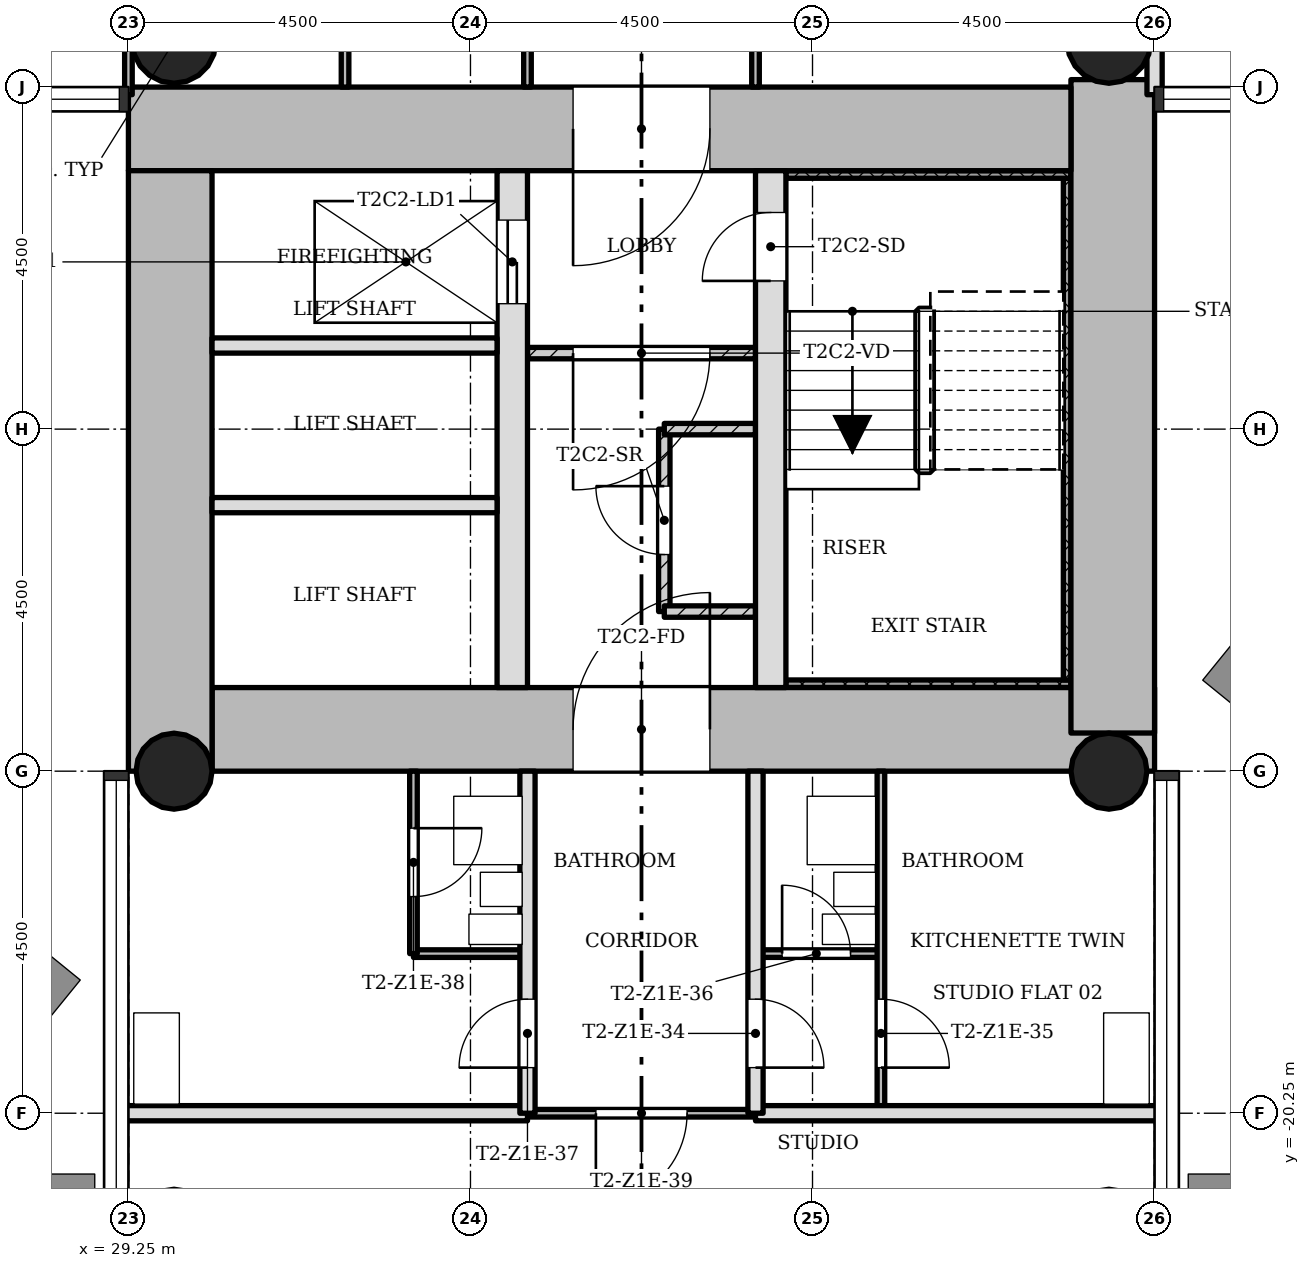
"""IFC4 building model, lengths in metres.
Left out: names, types, materials, properties, quantities, classifications, styles, units other than length and angle.
Written with IfcOpenShell. Run it as: python <this file> out.ifc"""

import sys

from ifc_helpers import new_model, si_unit, direction, frame, frame_2d, origin, origin_2d, place, context, subcontext, project, spatial, rectangle, hollow_circle, extrude, element, fill, save


model = new_model("IFC4")
c1 = context("Model", 3, precision=1e-05, world=origin(), true_north=direction((0.0, 1.0)))
c2 = subcontext(c1, "Body", "Model", "MODEL_VIEW")
j1 = project(units=[si_unit("LENGTHUNIT", "METRE"), si_unit("PLANEANGLEUNIT", "RADIAN")], contexts=[c1])
p1 = place(None, origin())
s1 = spatial("IfcSite", under=j1, at=p1, CompositionType="ELEMENT")
p2 = place(p1, origin())
s2 = spatial("IfcBuilding", under=s1, at=p2, CompositionType="ELEMENT")
p3 = place(p2, frame((0.0, 0.0, 65.3)))
s3 = spatial("IfcBuildingStorey", under=s2, at=p3, CompositionType="ELEMENT", Elevation=65.3)
p4 = place(p3, frame((30.35, -15.2, 0.0), z_axis=(0.0, 0.0, 1.0), x_axis=(1.0, 0.0, 0.0)))
e1 = element("IfcWall", 1, at=p4, inside=s3, PredefinedType="SHEAR", context=c2, shape_type="SweptSolid", body=[
    extrude(rectangle(XDim=12.4, YDim=1.1, at=frame_2d((6.2, 0.0))), origin(), (0.0, 0.0, 1.0), 3.4),
])
p5 = place(p4, frame((4.75, 0.0, 0.0)))
e2 = element("IfcOpeningElement", 2, at=p5, cuts=e1, PredefinedType="OPENING", context=c2, shape_type="SweptSolid", body=[
    extrude(rectangle(XDim=1.8, YDim=2.1, at=frame_2d((0.9, 1.05))), frame((0.0, 0.56, 0.0), z_axis=(0.0, -1.0, 0.0), x_axis=(1.0, 0.0, 0.0)), (0.0, 0.0, 1.0), 1.12),
])
p6 = place(p3, frame((42.2, -15.248, 0.0), z_axis=(0.0, 0.0, 1.0), x_axis=(0.0, 1.0, 0.0)))
e3 = element("IfcWall", 3, at=p6, inside=s3, PredefinedType="SHEAR", context=c2, shape_type="SweptSolid", body=[
    extrude(rectangle(XDim=8.596, YDim=1.1, at=frame_2d((4.298, 0.0))), origin(), (0.0, 0.0, 1.0), 3.4),
])
p7 = place(p3, frame((41.65, -7.3, 0.0), z_axis=(0.0, 0.0, 1.0), x_axis=(-1.0, 0.0, 0.0)))
e4 = element("IfcWall", 4, at=p7, inside=s3, PredefinedType="SHEAR", context=c2, shape_type="SweptSolid", body=[
    extrude(rectangle(XDim=12.4, YDim=1.1, at=frame_2d((6.2, 0.0))), origin(), (0.0, 0.0, 1.0), 3.4),
])
p8 = place(p7, frame((4.75, 0.0, 0.0)))
e5 = element("IfcOpeningElement", 5, at=p8, cuts=e4, PredefinedType="OPENING", context=c2, shape_type="SweptSolid", body=[
    extrude(rectangle(XDim=1.8, YDim=2.1, at=frame_2d((0.9, 1.05))), frame((0.0, 0.56, 0.0), z_axis=(0.0, -1.0, 0.0), x_axis=(1.0, 0.0, 0.0)), (0.0, 0.0, 1.0), 1.12),
])
p9 = place(p3, frame((29.8, -7.85, 0.0), z_axis=(0.0, 0.0, 1.0), x_axis=(0.0, -1.0, 0.0)))
e6 = element("IfcWall", 6, at=p9, inside=s3, PredefinedType="SHEAR", context=c2, shape_type="SweptSolid", body=[
    extrude(rectangle(XDim=7.9, YDim=1.1, at=frame_2d((3.95, 0.0))), origin(), (0.0, 0.0, 1.0), 3.4),
])
p10 = place(p3, frame((34.3, -14.65, 0.0), z_axis=(0.0, 0.0, 1.0), x_axis=(0.0, 1.0, 0.0)))
e7 = element("IfcWall", 7, at=p10, inside=s3, PredefinedType="SHEAR", context=c2, shape_type="SweptSolid", body=[
    extrude(rectangle(XDim=6.8, YDim=0.4, at=frame_2d((3.4, 0.0))), origin(), (0.0, 0.0, 1.0), 3.4),
])
p11 = place(p10, frame((5.05, 0.0, 0.0)))
e8 = element("IfcOpeningElement", 8, at=p11, cuts=e7, PredefinedType="OPENING", context=c2, shape_type="SweptSolid", body=[
    extrude(rectangle(XDim=1.1, YDim=2.1, at=frame_2d((0.55, 1.05))), frame((0.0, 0.21, 0.0), z_axis=(0.0, -1.0, 0.0), x_axis=(1.0, 0.0, 0.0)), (0.0, 0.0, 1.0), 0.42),
])
p12 = place(p3, frame((37.7, -14.65, 0.0), z_axis=(0.0, 0.0, 1.0), x_axis=(0.0, 1.0, 0.0)))
e9 = element("IfcWall", 9, at=p12, inside=s3, PredefinedType="SHEAR", context=c2, shape_type="SweptSolid", body=[
    extrude(rectangle(XDim=6.8, YDim=0.4, at=frame_2d((3.4, 0.0))), origin(), (0.0, 0.0, 1.0), 3.4),
])
p13 = place(p12, frame((5.35, 0.0, 0.0)))
e10 = element("IfcOpeningElement", 10, at=p13, cuts=e9, PredefinedType="OPENING", context=c2, shape_type="SweptSolid", body=[
    extrude(rectangle(XDim=0.9, YDim=2.1, at=frame_2d((0.45, 1.05))), frame((0.0, 0.21, 0.0), z_axis=(0.0, -1.0, 0.0), x_axis=(1.0, 0.0, 0.0)), (0.0, 0.0, 1.0), 0.42),
])
for number, where, z_axis, x_axis in (
    (11, (42.15, -15.75, 0.0), (0.0, 0.0, 1.0), (1.0, 0.0, 0.0)),
    (12, (29.85, -15.75, 0.0), (0.0, 0.0, 1.0), (1.0, 0.0, 0.0)),
):
    element("IfcColumn", number, at=place(p3, frame(where, z_axis=z_axis, x_axis=x_axis)), inside=s3, PredefinedType="COLUMN", context=c2, shape_type="SweptSolid", body=[
        extrude(hollow_circle(Radius=0.5, WallThickness=0.036, at=origin_2d()), origin(), (0.0, 0.0, 1.0), 3.4),
    ])
for number, where, z_axis, x_axis in (
    (13, (42.15, -6.15, 0.0), (0.0, 0.0, 1.0), (1.0, 0.0, 0.0)),
    (14, (29.85, -6.15, 0.0), (0.0, 0.0, 1.0), (1.0, 0.0, 0.0)),
):
    element("IfcColumn", number, at=place(p3, frame(where, z_axis=z_axis, x_axis=x_axis)), inside=s3, PredefinedType="COLUMN", context=c2, shape_type="SweptSolid", body=[
        extrude(hollow_circle(Radius=0.55, WallThickness=0.04, at=origin_2d()), origin(), (0.0, 0.0, 1.0), 3.4),
    ])
p14 = place(p3, frame((34.5, -10.25, 0.0), z_axis=(0.0, 0.0, 1.0), x_axis=(1.0, 0.0, 0.0)))
e15 = element("IfcWall", 15, at=p14, inside=s3, PredefinedType="PARTITIONING", context=c2, shape_type="SweptSolid", body=[
    extrude(rectangle(XDim=3.0, YDim=0.15, at=frame_2d((1.5, 0.0))), origin(), (0.0, 0.0, 1.0), 3.0),
])
p15 = place(p14, frame((0.6, 0.0, 0.0)))
e16 = element("IfcOpeningElement", 16, at=p15, cuts=e15, PredefinedType="OPENING", context=c2, shape_type="SweptSolid", body=[
    extrude(rectangle(XDim=1.8, YDim=2.1, at=frame_2d((0.9, 1.05))), frame((0.0, 0.085, 0.0), z_axis=(0.0, -1.0, 0.0), x_axis=(1.0, 0.0, 0.0)), (0.0, 0.0, 1.0), 0.17),
])
for number, where, z_axis, x_axis in (
    (17, (30.35, -10.15, 0.0), (0.0, 0.0, 1.0), (1.0, 0.0, 0.0)),
    (18, (30.35, -12.25, 0.0), (0.0, 0.0, 1.0), (1.0, 0.0, 0.0)),
):
    element("IfcWall", number, at=place(p3, frame(where, z_axis=z_axis, x_axis=x_axis)), inside=s3, PredefinedType="SOLIDWALL", context=c2, shape_type="SweptSolid", body=[
        extrude(rectangle(XDim=3.75, YDim=0.2, at=frame_2d((1.875, 0.0))), origin(), (0.0, 0.0, 1.0), 3.0),
    ])
p16 = place(p3, frame((36.3, -11.25, 0.0), z_axis=(0.0, 0.0, 1.0), x_axis=(0.0, -1.0, 0.0)))
e19 = element("IfcWall", 19, at=p16, inside=s3, PredefinedType="PARTITIONING", context=c2, shape_type="SweptSolid", body=[
    extrude(rectangle(XDim=2.4, YDim=0.15, at=frame_2d((1.2, 0.0))), origin(), (0.0, 0.0, 1.0), 3.0),
])
p17 = place(p16, frame((0.75, 0.0, 0.0)))
e20 = element("IfcOpeningElement", 20, at=p17, cuts=e19, PredefinedType="OPENING", context=c2, shape_type="SweptSolid", body=[
    extrude(rectangle(XDim=0.9, YDim=2.1, at=frame_2d((0.45, 1.05))), frame((0.0, 0.085, 0.0), z_axis=(0.0, -1.0, 0.0), x_axis=(1.0, 0.0, 0.0)), (0.0, 0.0, 1.0), 0.17),
])
for number, where, z_axis, x_axis in (
    (21, (36.3, -11.25, 0.0), (0.0, 0.0, 1.0), (1.0, 0.0, 0.0)),
    (22, (36.3, -13.65, 0.0), (0.0, 0.0, 1.0), (1.0, 0.0, 0.0)),
):
    element("IfcWall", number, at=place(p3, frame(where, z_axis=z_axis, x_axis=x_axis)), inside=s3, PredefinedType="PARTITIONING", context=c2, shape_type="SweptSolid", body=[
        extrude(rectangle(XDim=1.2, YDim=0.15, at=frame_2d((0.6, 0.0))), origin(), (0.0, 0.0, 1.0), 3.0),
    ])
p18 = place(p3, frame((37.5, -20.25, 0.0), z_axis=(0.0, 0.0, 1.0), x_axis=(-1.0, 0.0, 0.0)))
e23 = element("IfcWall", 23, at=p18, inside=s3, PredefinedType="PARTITIONING", context=c2, shape_type="SweptSolid", body=[
    extrude(rectangle(XDim=3.0, YDim=0.1, at=frame_2d((1.5, 0.0))), origin(), (0.0, 0.0, 1.0), 3.0),
])
p19 = place(p18, frame((0.9, 0.0, 0.0)))
e24 = element("IfcOpeningElement", 24, at=p19, cuts=e23, PredefinedType="OPENING", context=c2, shape_type="SweptSolid", body=[
    extrude(rectangle(XDim=1.2, YDim=2.1, at=frame_2d((0.6, 1.05))), frame((0.0, 0.06, 0.0), z_axis=(0.0, -1.0, 0.0), x_axis=(1.0, 0.0, 0.0)), (0.0, 0.0, 1.0), 0.12),
])
for number, where, z_axis, x_axis in (
    (25, (42.85, -20.25, 0.0), (0.0, 0.0, 1.0), (-1.0, 0.0, 0.0)),
    (26, (34.5, -20.25, 0.0), (0.0, 0.0, 1.0), (-1.0, 0.0, 0.0)),
):
    element("IfcWall", number, at=place(p3, frame(where, z_axis=z_axis, x_axis=x_axis)), inside=s3, PredefinedType="SOLIDWALL", context=c2, shape_type="SweptSolid", body=[
        extrude(rectangle(XDim=5.35, YDim=0.2, at=frame_2d((2.675, 0.0))), origin(), (0.0, 0.0, 1.0), 3.0),
    ])
p20 = place(p3, frame((39.15, -18.15, 0.0), z_axis=(0.0, 0.0, 1.0), x_axis=(-1.0, 0.0, 0.0)))
e27 = element("IfcWall", 27, at=p20, inside=s3, PredefinedType="PARTITIONING", context=c2, shape_type="SweptSolid", body=[
    extrude(rectangle(XDim=1.65, YDim=0.1, at=frame_2d((0.825, 0.0))), origin(), (0.0, 0.0, 1.0), 3.0),
])
p21 = place(p20, frame((0.4, 0.0, 0.0)))
e28 = element("IfcOpeningElement", 28, at=p21, cuts=e27, PredefinedType="OPENING", context=c2, shape_type="SweptSolid", body=[
    extrude(rectangle(XDim=0.9, YDim=2.1, at=frame_2d((0.45, 1.05))), frame((0.0, 0.06, 0.0), z_axis=(0.0, -1.0, 0.0), x_axis=(1.0, 0.0, 0.0)), (0.0, 0.0, 1.0), 0.12),
])
p22 = place(p3, frame((34.5, -18.15, 0.0), z_axis=(0.0, 0.0, 1.0), x_axis=(-1.0, 0.0, 0.0)))
e29 = element("IfcWall", 29, at=p22, inside=s3, PredefinedType="PARTITIONING", context=c2, shape_type="SweptSolid", body=[
    extrude(rectangle(XDim=1.5, YDim=0.1, at=frame_2d((0.75, 0.0))), origin(), (0.0, 0.0, 1.0), 3.0),
])
p23 = place(p3, frame((42.75, -6.85, 0.0), z_axis=(0.0, 0.0, 1.0), x_axis=(0.0, 1.0, 0.0)))
e30 = element("IfcWall", 30, at=p23, inside=s3, PredefinedType="SOLIDWALL", context=c2, shape_type="SweptSolid", body=[
    extrude(rectangle(XDim=13.7, YDim=0.2, at=frame_2d((6.85, 0.0))), origin(), (0.0, 0.0, 1.0), 3.0),
])
p24 = place(p23, frame((6.4, 0.0, 0.0)))
e31 = element("IfcOpeningElement", 31, at=p24, cuts=e30, PredefinedType="OPENING", context=c2, shape_type="SweptSolid", body=[
    extrude(rectangle(XDim=0.9, YDim=2.1, at=frame_2d((0.45, 1.05))), frame((0.0, 0.11, 0.0), z_axis=(0.0, -1.0, 0.0), x_axis=(1.0, 0.0, 0.0)), (0.0, 0.0, 1.0), 0.22),
])
p25 = place(p3, frame((39.15, -20.25, 0.0), z_axis=(0.0, 0.0, 1.0), x_axis=(0.0, 1.0, 0.0)))
e32 = element("IfcWall", 32, at=p25, inside=s3, PredefinedType="PARTITIONING", context=c2, shape_type="SweptSolid", body=[
    extrude(rectangle(XDim=4.5, YDim=0.1, at=frame_2d((2.25, 0.0))), origin(), (0.0, 0.0, 1.0), 3.0),
])
p26 = place(p25, frame((0.6, 0.0, 0.0)))
e33 = element("IfcOpeningElement", 33, at=p26, cuts=e32, PredefinedType="OPENING", context=c2, shape_type="SweptSolid", body=[
    extrude(rectangle(XDim=0.9, YDim=2.1, at=frame_2d((0.45, 1.05))), frame((0.0, 0.06, 0.0), z_axis=(0.0, -1.0, 0.0), x_axis=(1.0, 0.0, 0.0)), (0.0, 0.0, 1.0), 0.12),
])
p27 = place(p3, frame((37.5, -6.75, 0.0), z_axis=(0.0, 0.0, 1.0), x_axis=(0.0, 1.0, 0.0)))
e34 = element("IfcWall", 34, at=p27, inside=s3, PredefinedType="PARTITIONING", context=c2, shape_type="SweptSolid", body=[
    extrude(rectangle(XDim=5.85, YDim=0.1, at=frame_2d((2.925, 0.0))), origin(), (0.0, 0.0, 1.0), 3.0),
])
p28 = place(p27, frame((0.975, 0.0, 0.0)))
e35 = element("IfcOpeningElement", 35, at=p28, cuts=e34, PredefinedType="OPENING", context=c2, shape_type="SweptSolid", body=[
    extrude(rectangle(XDim=0.9, YDim=2.1, at=frame_2d((0.45, 1.05))), frame((0.0, 0.06, 0.0), z_axis=(0.0, -1.0, 0.0), x_axis=(1.0, 0.0, 0.0)), (0.0, 0.0, 1.0), 0.12),
])
p29 = place(p3, frame((37.5, -20.25, 0.0), z_axis=(0.0, 0.0, 1.0), x_axis=(0.0, 1.0, 0.0)))
e36 = element("IfcWall", 36, at=p29, inside=s3, PredefinedType="SOLIDWALL", context=c2, shape_type="SweptSolid", body=[
    extrude(rectangle(XDim=4.5, YDim=0.2, at=frame_2d((2.25, 0.0))), origin(), (0.0, 0.0, 1.0), 3.0),
])
p30 = place(p29, frame((0.6, 0.0, 0.0)))
e37 = element("IfcOpeningElement", 37, at=p30, cuts=e36, PredefinedType="OPENING", context=c2, shape_type="SweptSolid", body=[
    extrude(rectangle(XDim=0.9, YDim=2.1, at=frame_2d((0.45, 1.05))), frame((0.0, 0.11, 0.0), z_axis=(0.0, -1.0, 0.0), x_axis=(1.0, 0.0, 0.0)), (0.0, 0.0, 1.0), 0.22),
])
p31 = place(p3, frame((34.5, -6.75, 0.0), z_axis=(0.0, 0.0, 1.0), x_axis=(0.0, 1.0, 0.0)))
e38 = element("IfcWall", 38, at=p31, inside=s3, PredefinedType="PARTITIONING", context=c2, shape_type="SweptSolid", body=[
    extrude(rectangle(XDim=5.85, YDim=0.1, at=frame_2d((2.925, 0.0))), origin(), (0.0, 0.0, 1.0), 3.0),
])
p32 = place(p31, frame((1.575, 0.0, 0.0)))
e39 = element("IfcOpeningElement", 39, at=p32, cuts=e38, PredefinedType="OPENING", context=c2, shape_type="SweptSolid", body=[
    extrude(rectangle(XDim=0.9, YDim=2.1, at=frame_2d((0.45, 1.05))), frame((0.0, 0.06, 0.0), z_axis=(0.0, -1.0, 0.0), x_axis=(1.0, 0.0, 0.0)), (0.0, 0.0, 1.0), 0.12),
])
p33 = place(p3, frame((34.5, -20.25, 0.0), z_axis=(0.0, 0.0, 1.0), x_axis=(0.0, 1.0, 0.0)))
e40 = element("IfcWall", 40, at=p33, inside=s3, PredefinedType="SOLIDWALL", context=c2, shape_type="SweptSolid", body=[
    extrude(rectangle(XDim=4.5, YDim=0.2, at=frame_2d((2.25, 0.0))), origin(), (0.0, 0.0, 1.0), 3.0),
])
p34 = place(p33, frame((0.6, 0.0, 0.0)))
e41 = element("IfcOpeningElement", 41, at=p34, cuts=e40, PredefinedType="OPENING", context=c2, shape_type="SweptSolid", body=[
    extrude(rectangle(XDim=0.9, YDim=2.1, at=frame_2d((0.45, 1.05))), frame((0.0, 0.11, 0.0), z_axis=(0.0, -1.0, 0.0), x_axis=(1.0, 0.0, 0.0)), (0.0, 0.0, 1.0), 0.22),
])
p35 = place(p3, frame((33.0, -18.15, 0.0), z_axis=(0.0, 0.0, 1.0), x_axis=(0.0, 1.0, 0.0)))
e42 = element("IfcWall", 42, at=p35, inside=s3, PredefinedType="PARTITIONING", context=c2, shape_type="SweptSolid", body=[
    extrude(rectangle(XDim=2.4, YDim=0.1, at=frame_2d((1.2, 0.0))), origin(), (0.0, 0.0, 1.0), 3.0),
])
p36 = place(p35, frame((0.75, 0.0, 0.0)))
e43 = element("IfcOpeningElement", 43, at=p36, cuts=e42, PredefinedType="OPENING", context=c2, shape_type="SweptSolid", body=[
    extrude(rectangle(XDim=0.9, YDim=2.1, at=frame_2d((0.45, 1.05))), frame((0.0, 0.06, 0.0), z_axis=(0.0, -1.0, 0.0), x_axis=(1.0, 0.0, 0.0)), (0.0, 0.0, 1.0), 0.12),
])
p37 = place(p3, frame((32.1, -6.75, 0.0), z_axis=(0.0, 0.0, 1.0), x_axis=(0.0, 1.0, 0.0)))
e44 = element("IfcWall", 44, at=p37, inside=s3, PredefinedType="PARTITIONING", context=c2, shape_type="SweptSolid", body=[
    extrude(rectangle(XDim=5.85, YDim=0.1, at=frame_2d((2.925, 0.0))), origin(), (0.0, 0.0, 1.0), 3.0),
])
p38 = place(p3, frame((29.25, -6.85, 0.0), z_axis=(0.0, 0.0, 1.0), x_axis=(0.0, 1.0, 0.0)))
e45 = element("IfcWall", 45, at=p38, inside=s3, PredefinedType="PARTITIONING", context=c2, shape_type="SweptSolid", body=[
    extrude(rectangle(XDim=5.95, YDim=0.1, at=frame_2d((2.975, 0.0))), origin(), (0.0, 0.0, 1.0), 3.0),
])
p39 = place(p3, frame((37.9, -14.6, 0.0), z_axis=(0.0, 0.0, 1.0), x_axis=(1.0, 0.0, 0.0)))
e46 = element("IfcWall", 46, at=p39, inside=s3, PredefinedType="SHEAR", context=c2, shape_type="SweptSolid", body=[
    extrude(rectangle(XDim=3.75, YDim=0.1, at=frame_2d((1.875, 0.0))), origin(), (0.0, 0.0, 1.0), 3.4),
])
p40 = place(p3, frame((41.6, -7.95, 0.0), z_axis=(0.0, 0.0, 1.0), x_axis=(0.0, -1.0, 0.0)))
e47 = element("IfcWall", 47, at=p40, inside=s3, PredefinedType="SHEAR", context=c2, shape_type="SweptSolid", body=[
    extrude(rectangle(XDim=6.6, YDim=0.1, at=frame_2d((3.3, 0.0))), origin(), (0.0, 0.0, 1.0), 3.4),
])
p41 = place(p3, frame((37.9, -7.9, 0.0), z_axis=(0.0, 0.0, 1.0), x_axis=(1.0, 0.0, 0.0)))
e48 = element("IfcWall", 48, at=p41, inside=s3, PredefinedType="SHEAR", context=c2, shape_type="SweptSolid", body=[
    extrude(rectangle(XDim=3.75, YDim=0.1, at=frame_2d((1.875, 0.0))), origin(), (0.0, 0.0, 1.0), 3.4),
])
p42 = place(p15, origin())
e49 = element("IfcDoor", 49, at=p42, inside=s3, OperationType="SINGLE_SWING_LEFT", PredefinedType="DOOR", context=c2, shape_type="SweptSolid", body=[
    extrude(rectangle(XDim=1.8, YDim=2.1, at=frame_2d((0.9, 1.05))), frame((0.0, 0.025, 0.0), z_axis=(0.0, -1.0, 0.0), x_axis=(1.0, 0.0, 0.0)), (0.0, 0.0, 1.0), 0.05),
])
fill(e16, e49)
p43 = place(p17, origin())
e50 = element("IfcDoor", 50, at=p43, inside=s3, OperationType="SINGLE_SWING_LEFT", PredefinedType="DOOR", context=c2, shape_type="SweptSolid", body=[
    extrude(rectangle(XDim=0.9, YDim=2.1, at=frame_2d((0.45, 1.05))), frame((0.0, 0.025, 0.0), z_axis=(0.0, -1.0, 0.0), x_axis=(1.0, 0.0, 0.0)), (0.0, 0.0, 1.0), 0.05),
])
fill(e20, e50)
p44 = place(p30, origin())
e51 = element("IfcDoor", 51, at=p44, inside=s3, OperationType="SINGLE_SWING_LEFT", PredefinedType="DOOR", context=c2, shape_type="SweptSolid", body=[
    extrude(rectangle(XDim=0.9, YDim=2.1, at=frame_2d((0.45, 1.05))), frame((0.0, 0.025, 0.0), z_axis=(0.0, -1.0, 0.0), x_axis=(1.0, 0.0, 0.0)), (0.0, 0.0, 1.0), 0.05),
])
fill(e37, e51)
p45 = place(p26, origin())
e52 = element("IfcDoor", 52, at=p45, inside=s3, OperationType="SINGLE_SWING_LEFT", PredefinedType="DOOR", context=c2, shape_type="SweptSolid", body=[
    extrude(rectangle(XDim=0.9, YDim=2.1, at=frame_2d((0.45, 1.05))), frame((0.0, 0.025, 0.0), z_axis=(0.0, -1.0, 0.0), x_axis=(1.0, 0.0, 0.0)), (0.0, 0.0, 1.0), 0.05),
])
fill(e33, e52)
p46 = place(p21, origin())
e53 = element("IfcDoor", 53, at=p46, inside=s3, OperationType="SINGLE_SWING_RIGHT", PredefinedType="DOOR", context=c2, shape_type="SweptSolid", body=[
    extrude(rectangle(XDim=0.9, YDim=2.1, at=frame_2d((0.45, 1.05))), frame((0.0, 0.025, 0.0), z_axis=(0.0, -1.0, 0.0), x_axis=(1.0, 0.0, 0.0)), (0.0, 0.0, 1.0), 0.05),
])
fill(e28, e53)
p47 = place(p34, origin())
e54 = element("IfcDoor", 54, at=p47, inside=s3, OperationType="SINGLE_SWING_RIGHT", PredefinedType="DOOR", context=c2, shape_type="SweptSolid", body=[
    extrude(rectangle(XDim=0.9, YDim=2.1, at=frame_2d((0.45, 1.05))), frame((0.0, 0.025, 0.0), z_axis=(0.0, -1.0, 0.0), x_axis=(1.0, 0.0, 0.0)), (0.0, 0.0, 1.0), 0.05),
])
fill(e41, e54)
p48 = place(p36, origin())
e55 = element("IfcDoor", 55, at=p48, inside=s3, OperationType="SINGLE_SWING_RIGHT", PredefinedType="DOOR", context=c2, shape_type="SweptSolid", body=[
    extrude(rectangle(XDim=0.9, YDim=2.1, at=frame_2d((0.45, 1.05))), frame((0.0, 0.025, 0.0), z_axis=(0.0, -1.0, 0.0), x_axis=(1.0, 0.0, 0.0)), (0.0, 0.0, 1.0), 0.05),
])
fill(e43, e55)
p49 = place(p19, origin())
e56 = element("IfcDoor", 56, at=p49, inside=s3, OperationType="SINGLE_SWING_LEFT", PredefinedType="DOOR", context=c2, shape_type="SweptSolid", body=[
    extrude(rectangle(XDim=1.2, YDim=2.1, at=frame_2d((0.6, 1.05))), frame((0.0, 0.025, 0.0), z_axis=(0.0, -1.0, 0.0), x_axis=(1.0, 0.0, 0.0)), (0.0, 0.0, 1.0), 0.05),
])
fill(e24, e56)
p50 = place(p13, origin())
e57 = element("IfcDoor", 57, at=p50, inside=s3, OperationType="SINGLE_SWING_RIGHT", PredefinedType="DOOR", context=c2, shape_type="SweptSolid", body=[
    extrude(rectangle(XDim=0.9, YDim=2.1, at=frame_2d((0.45, 1.05))), frame((0.0, 0.025, 0.0), z_axis=(0.0, -1.0, 0.0), x_axis=(1.0, 0.0, 0.0)), (0.0, 0.0, 1.0), 0.05),
])
fill(e10, e57)
p51 = place(p11, origin())
e58 = element("IfcDoor", 58, at=p51, inside=s3, OperationType="SLIDING_TO_LEFT", PredefinedType="DOOR", context=c2, shape_type="SweptSolid", body=[
    extrude(rectangle(XDim=1.1, YDim=2.1, at=frame_2d((0.55, 1.05))), frame((0.0, 0.025, 0.0), z_axis=(0.0, -1.0, 0.0), x_axis=(1.0, 0.0, 0.0)), (0.0, 0.0, 1.0), 0.05),
])
fill(e8, e58)
p52 = place(p8, origin())
e59 = element("IfcDoor", 59, at=p52, inside=s3, OperationType="SINGLE_SWING_LEFT", PredefinedType="DOOR", context=c2, shape_type="SweptSolid", body=[
    extrude(rectangle(XDim=1.8, YDim=2.1, at=frame_2d((0.9, 1.05))), frame((0.0, 0.025, 0.0), z_axis=(0.0, -1.0, 0.0), x_axis=(1.0, 0.0, 0.0)), (0.0, 0.0, 1.0), 0.05),
])
fill(e5, e59)
p53 = place(p5, origin())
e60 = element("IfcDoor", 60, at=p53, inside=s3, OperationType="SINGLE_SWING_LEFT", PredefinedType="DOOR", context=c2, shape_type="SweptSolid", body=[
    extrude(rectangle(XDim=1.8, YDim=2.1, at=frame_2d((0.9, 1.05))), frame((0.0, 0.025, 0.0), z_axis=(0.0, -1.0, 0.0), x_axis=(1.0, 0.0, 0.0)), (0.0, 0.0, 1.0), 0.05),
])
fill(e2, e60)
save(model, sys.argv[1])
